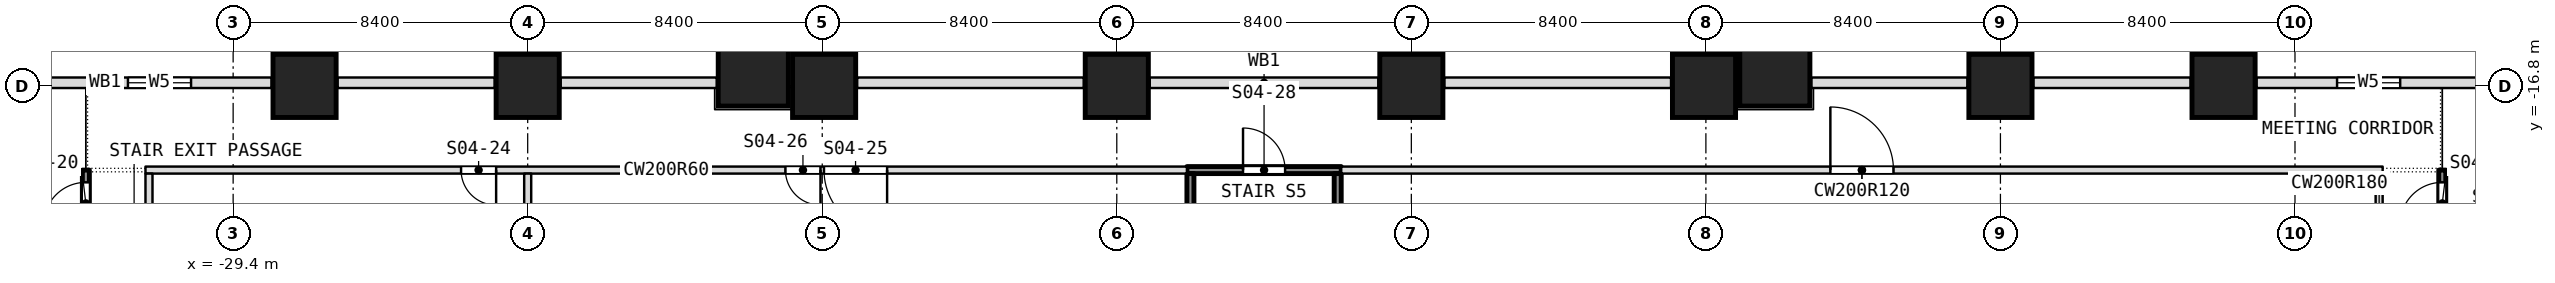
"""IFC4 building model, lengths in metres.
Left out: names, types, materials, properties, quantities, classifications, styles, units other than length and angle.
Written with IfcOpenShell. Run it as: python <this file> out.ifc"""

import sys

from ifc_helpers import new_model, si_unit, direction, frame, frame_2d, origin, origin_2d, place, context, subcontext, project, spatial, polyline, rectangle, outline, extrude, element, fill, save


model = new_model("IFC4")
c1 = context("Model", 3, precision=1e-05, world=origin(), true_north=direction((0.0, 1.0)))
c2 = subcontext(c1, "Body", "Model", "MODEL_VIEW")
j1 = project(units=[si_unit("LENGTHUNIT", "METRE"), si_unit("PLANEANGLEUNIT", "RADIAN")], contexts=[c1])
p1 = place(None, origin())
s1 = spatial("IfcSite", under=j1, at=p1, CompositionType="ELEMENT")
p2 = place(p1, origin())
s2 = spatial("IfcBuilding", under=s1, at=p2, CompositionType="ELEMENT")
p3 = place(p2, frame((0.0, 0.0, 21.0)))
s3 = spatial("IfcBuildingStorey", under=s2, at=p3, CompositionType="ELEMENT", Elevation=21.0)
for number, where, z_axis, x_axis in (
    (1, (-21.0, -16.8, 0.0), (0.0, 0.0, 1.0), (1.0, 0.0, 0.0)),
    (2, (-12.546, -16.8, 0.0), (0.0, 0.0, 1.0), (1.0, 0.0, 0.0)),
    (3, (-4.2, -16.8, 0.0), (0.0, 0.0, 1.0), (1.0, 0.0, 0.0)),
    (4, (4.2, -16.8, 0.0), (0.0, 0.0, 1.0), (1.0, 0.0, 0.0)),
    (5, (12.546, -16.8, 0.0), (0.0, 0.0, 1.0), (1.0, 0.0, 0.0)),
    (6, (21.0, -16.8, 0.0), (0.0, 0.0, 1.0), (1.0, 0.0, 0.0)),
    (7, (-27.363, -16.8, 0.0), (0.0, 0.0, 1.0), (1.0, 0.0, 0.0)),
    (8, (27.363, -16.8, 0.0), (0.0, 0.0, 1.0), (1.0, 0.0, 0.0)),
):
    element("IfcColumn", number, at=place(p3, frame(where, z_axis=z_axis, x_axis=x_axis)), inside=s3, PredefinedType="COLUMN", context=c2, shape_type="SweptSolid", body=[
        extrude(rectangle(XDim=1.8, YDim=1.8, at=origin_2d()), origin(), (0.0, 0.0, 1.0), 5.0),
    ])
for number, where, z_axis, x_axis in (
    (9, (-14.566, -16.375, 0.0), (0.0, 0.0, 1.0), (1.0, 0.0, 0.0)),
    (10, (14.566, -16.375, 0.0), (0.0, 0.0, 1.0), (1.0, 0.0, 0.0)),
):
    element("IfcColumn", number, at=place(p3, frame(where, z_axis=z_axis, x_axis=x_axis)), inside=s3, PredefinedType="COLUMN", context=c2, shape_type="SweptSolid", body=[
        extrude(rectangle(XDim=2.0, YDim=2.0, at=origin_2d()), origin(), (0.0, 0.0, 1.0), 5.0),
    ])
p4 = place(p3, frame((37.8, -14.4, 4.641), z_axis=(1.0, 0.0, 0.0), x_axis=(0.0, 0.799608184746, 0.600522065279)))
e11 = element("IfcWall", 11, at=p4, inside=s3, PredefinedType="SOLIDWALL", context=c2, shape_type="SweptSolid", body=[
    extrude(outline(polyline([(0.0, 0.0), (0.598, -5.551e-17), (-3.622, 3.17), (-6.625, -0.828), (-5.43, -1.726), (-3.625, -0.83), (-1.684, -0.243), (0.0, 0.0)])), origin(), (0.0, 0.0, -1.0), 4.2),
])
p5 = place(p3, frame((-37.8, -14.4, 4.641), z_axis=(-1.0, 0.0, 0.0), x_axis=(0.0, -0.705526339146, -0.708683698678)))
e12 = element("IfcWall", 12, at=p5, inside=s3, PredefinedType="SOLIDWALL", context=c2, shape_type="SweptSolid", body=[
    extrude(outline(polyline([(0.0, 0.0), (1.701, -1.11e-16), (3.707, -0.304), (5.621, -0.932), (6.675, 0.128), (3.132, 3.655), (-0.592, -0.086), (0.0, 0.0)])), origin(), (0.0, 0.0, -1.0), 4.2),
])
p6 = place(p3, frame((33.6, -22.3, 0.0), z_axis=(0.0, 0.0, 1.0), x_axis=(0.0, 1.0, 0.0)))
e13 = element("IfcWall", 13, at=p6, inside=s3, PredefinedType="PARTITIONING", context=c2, shape_type="SweptSolid", body=[
    extrude(rectangle(XDim=3.1, YDim=0.2, at=frame_2d((1.55, 0.0))), origin(), (0.0, 0.0, 1.0), 4.68),
])
p7 = place(p6, frame((1.55, 0.0, 0.0)))
e14 = element("IfcOpeningElement", 14, at=p7, cuts=e13, PredefinedType="OPENING", context=c2, shape_type="SweptSolid", body=[
    extrude(rectangle(XDim=1.2, YDim=2.1, at=frame_2d((0.6, 1.05))), frame((0.0, 0.1, 0.0), z_axis=(0.0, -1.0, 0.0), x_axis=(1.0, 0.0, 0.0)), (0.0, 0.0, 1.0), 0.2),
])
p8 = place(p3, frame((31.8, -22.1, 0.0), z_axis=(0.0, 0.0, 1.0), x_axis=(0.0, 1.0, 0.0)))
e15 = element("IfcWall", 15, at=p8, inside=s3, PredefinedType="PARTITIONING", context=c2, shape_type="SweptSolid", body=[
    extrude(rectangle(XDim=2.8, YDim=0.2, at=frame_2d((1.4, 0.0))), origin(), (0.0, 0.0, 1.0), 4.68),
])
p9 = place(p3, frame((-31.9, -19.2, 0.0), z_axis=(0.0, 0.0, 1.0), x_axis=(1.0, 0.0, 0.0)))
e16 = element("IfcWall", 16, at=p9, inside=s3, PredefinedType="PARTITIONING", context=c2, shape_type="SweptSolid", body=[
    extrude(rectangle(XDim=29.7, YDim=0.2, at=frame_2d((14.85, 0.0))), origin(), (0.0, 0.0, 1.0), 4.68),
])
p10 = place(p9, frame((9.0, 0.0, 0.0)))
e17 = element("IfcOpeningElement", 17, at=p10, cuts=e16, PredefinedType="OPENING", context=c2, shape_type="SweptSolid", body=[
    extrude(rectangle(XDim=1.0, YDim=2.1, at=frame_2d((0.5, 1.05))), frame((0.0, 0.1, 0.0), z_axis=(0.0, -1.0, 0.0), x_axis=(1.0, 0.0, 0.0)), (0.0, 0.0, 1.0), 0.2),
])
p11 = place(p9, frame((19.35, 0.0, 0.0)))
e18 = element("IfcOpeningElement", 18, at=p11, cuts=e16, PredefinedType="OPENING", context=c2, shape_type="SweptSolid", body=[
    extrude(rectangle(XDim=1.8, YDim=2.1, at=frame_2d((0.9, 1.05))), frame((0.0, 0.1, 0.0), z_axis=(0.0, -1.0, 0.0), x_axis=(1.0, 0.0, 0.0)), (0.0, 0.0, 1.0), 0.2),
])
p12 = place(p9, frame((18.25, 0.0, 0.0)))
e19 = element("IfcOpeningElement", 19, at=p12, cuts=e16, PredefinedType="OPENING", context=c2, shape_type="SweptSolid", body=[
    extrude(rectangle(XDim=1.0, YDim=2.1, at=frame_2d((0.5, 1.05))), frame((0.0, 0.1, 0.0), z_axis=(0.0, -1.0, 0.0), x_axis=(1.0, 0.0, 0.0)), (0.0, 0.0, 1.0), 0.2),
])
p13 = place(p3, frame((2.2, -19.2, 0.0), z_axis=(0.0, 0.0, 1.0), x_axis=(1.0, 0.0, 0.0)))
e20 = element("IfcWall", 20, at=p13, inside=s3, PredefinedType="PARTITIONING", context=c2, shape_type="SweptSolid", body=[
    extrude(rectangle(XDim=29.7, YDim=0.2, at=frame_2d((14.85, 0.0))), origin(), (0.0, 0.0, 1.0), 4.68),
])
p14 = place(p13, frame((13.95, 0.0, 0.0)))
e21 = element("IfcOpeningElement", 21, at=p14, cuts=e20, PredefinedType="OPENING", context=c2, shape_type="SweptSolid", body=[
    extrude(rectangle(XDim=1.8, YDim=2.1, at=frame_2d((0.9, 1.05))), frame((0.0, 0.1, 0.0), z_axis=(0.0, -1.0, 0.0), x_axis=(1.0, 0.0, 0.0)), (0.0, 0.0, 1.0), 0.2),
])
p15 = place(p3, frame((-2.2, -19.2, 0.0), z_axis=(0.0, 0.0, 1.0), x_axis=(1.0, 0.0, 0.0)))
e22 = element("IfcWall", 22, at=p15, inside=s3, PredefinedType="PARTITIONING", context=c2, shape_type="SweptSolid", body=[
    extrude(rectangle(XDim=4.4, YDim=0.2, at=frame_2d((2.2, 0.0))), origin(), (0.0, 0.0, 1.0), 4.68),
])
p16 = place(p15, frame((1.6, 0.0, 0.0)))
e23 = element("IfcOpeningElement", 23, at=p16, cuts=e22, PredefinedType="OPENING", context=c2, shape_type="SweptSolid", body=[
    extrude(rectangle(XDim=1.2, YDim=2.1, at=frame_2d((0.6, 1.05))), frame((0.0, 0.1, 0.0), z_axis=(0.0, -1.0, 0.0), x_axis=(1.0, 0.0, 0.0)), (0.0, 0.0, 1.0), 0.2),
])
for number, where, z_axis, x_axis in (
    (24, (2.1, -25.14, 0.0), (0.0, 0.0, 1.0), (0.0, 1.0, 0.0)),
    (25, (-2.1, -25.14, 0.0), (0.0, 0.0, 1.0), (0.0, 1.0, 0.0)),
):
    element("IfcWall", number, at=place(p3, frame(where, z_axis=z_axis, x_axis=x_axis)), inside=s3, PredefinedType="PARTITIONING", context=c2, shape_type="SweptSolid", body=[
        extrude(rectangle(XDim=5.84, YDim=0.2, at=frame_2d((2.92, 0.0))), origin(), (0.0, 0.0, 1.0), 4.68),
    ])
p17 = place(p3, frame((-21.0, -25.5, 0.0), z_axis=(0.0, 0.0, 1.0), x_axis=(0.0, 1.0, 0.0)))
e26 = element("IfcWall", 26, at=p17, inside=s3, PredefinedType="PARTITIONING", context=c2, shape_type="SweptSolid", body=[
    extrude(rectangle(XDim=6.2, YDim=0.2, at=frame_2d((3.1, 0.0))), origin(), (0.0, 0.0, 1.0), 4.68),
])
p18 = place(p3, frame((-31.8, -22.1, 0.0), z_axis=(0.0, 0.0, 1.0), x_axis=(0.0, 1.0, 0.0)))
e27 = element("IfcWall", 27, at=p18, inside=s3, PredefinedType="PARTITIONING", context=c2, shape_type="SweptSolid", body=[
    extrude(rectangle(XDim=2.8, YDim=0.2, at=frame_2d((1.4, 0.0))), origin(), (0.0, 0.0, 1.0), 4.68),
])
p19 = place(p3, frame((-33.6, -22.3, 0.0), z_axis=(0.0, 0.0, 1.0), x_axis=(0.0, 1.0, 0.0)))
e28 = element("IfcWall", 28, at=p19, inside=s3, PredefinedType="PARTITIONING", context=c2, shape_type="SweptSolid", body=[
    extrude(rectangle(XDim=3.1, YDim=0.2, at=frame_2d((1.55, 0.0))), origin(), (0.0, 0.0, 1.0), 4.68),
])
p20 = place(p19, frame((1.55, 0.0, 0.0)))
e29 = element("IfcOpeningElement", 29, at=p20, cuts=e28, PredefinedType="OPENING", context=c2, shape_type="SweptSolid", body=[
    extrude(rectangle(XDim=1.2, YDim=2.1, at=frame_2d((0.6, 1.05))), frame((0.0, 0.1, 0.0), z_axis=(0.0, -1.0, 0.0), x_axis=(1.0, 0.0, 0.0)), (0.0, 0.0, 1.0), 0.2),
])
p21 = place(p3, frame((37.8, -16.71, 0.0), z_axis=(0.0, 0.0, 1.0), x_axis=(-1.0, 0.0, 0.0)))
e30 = element("IfcWall", 30, at=p21, inside=s3, PredefinedType="NOTDEFINED", context=c2, shape_type="SweptSolid", body=[
    extrude(rectangle(XDim=9.497, YDim=0.3, at=frame_2d((4.749, 0.0))), origin(), (0.0, 0.0, 1.0), 3.78),
])
p22 = place(p21, frame((5.4, 0.0, 1.2)))
e31 = element("IfcOpeningElement", 31, at=p22, cuts=e30, PredefinedType="OPENING", context=c2, shape_type="SweptSolid", body=[
    extrude(rectangle(XDim=1.8, YDim=2.4, at=frame_2d((0.9, 1.2))), frame((0.0, 0.15, 0.0), z_axis=(0.0, -1.0, 0.0), x_axis=(1.0, 0.0, 0.0)), (0.0, 0.0, 1.0), 0.3),
])
p23 = place(p3, frame((26.423, -16.71, 0.0), z_axis=(0.0, 0.0, 1.0), x_axis=(-1.0, 0.0, 0.0)))
e32 = element("IfcWall", 32, at=p23, inside=s3, PredefinedType="NOTDEFINED", context=c2, shape_type="SweptSolid", body=[
    extrude(rectangle(XDim=4.483, YDim=0.3, at=frame_2d((2.242, 0.0))), origin(), (0.0, 0.0, 1.0), 3.78),
])
p24 = place(p3, frame((20.06, -16.71, 0.0), z_axis=(0.0, 0.0, 1.0), x_axis=(-1.0, 0.0, 0.0)))
e33 = element("IfcWall", 33, at=p24, inside=s3, PredefinedType="NOTDEFINED", context=c2, shape_type="SweptSolid", body=[
    extrude(rectangle(XDim=4.454, YDim=0.3, at=frame_2d((2.227, 0.0))), origin(), (0.0, 0.0, 1.0), 3.78),
])
p25 = place(p3, frame((11.606, -16.71, 0.0), z_axis=(0.0, 0.0, 1.0), x_axis=(-1.0, 0.0, 0.0)))
e34 = element("IfcWall", 34, at=p25, inside=s3, PredefinedType="NOTDEFINED", context=c2, shape_type="SweptSolid", body=[
    extrude(rectangle(XDim=6.466, YDim=0.3, at=frame_2d((3.233, 0.0))), origin(), (0.0, 0.0, 1.0), 3.78),
])
p26 = place(p3, frame((3.26, -16.71, 0.0), z_axis=(0.0, 0.0, 1.0), x_axis=(-1.0, 0.0, 0.0)))
e35 = element("IfcWall", 35, at=p26, inside=s3, PredefinedType="NOTDEFINED", context=c2, shape_type="SweptSolid", body=[
    extrude(rectangle(XDim=6.52, YDim=0.3, at=frame_2d((3.26, 0.0))), origin(), (0.0, 0.0, 1.0), 3.78),
])
p27 = place(p3, frame((-5.14, -16.71, 0.0), z_axis=(0.0, 0.0, 1.0), x_axis=(-1.0, 0.0, 0.0)))
e36 = element("IfcWall", 36, at=p27, inside=s3, PredefinedType="NOTDEFINED", context=c2, shape_type="SweptSolid", body=[
    extrude(rectangle(XDim=6.466, YDim=0.3, at=frame_2d((3.233, 0.0))), origin(), (0.0, 0.0, 1.0), 3.78),
])
p28 = place(p3, frame((-15.606, -16.71, 0.0), z_axis=(0.0, 0.0, 1.0), x_axis=(-1.0, 0.0, 0.0)))
e37 = element("IfcWall", 37, at=p28, inside=s3, PredefinedType="NOTDEFINED", context=c2, shape_type="SweptSolid", body=[
    extrude(rectangle(XDim=4.454, YDim=0.3, at=frame_2d((2.227, 0.0))), origin(), (0.0, 0.0, 1.0), 3.78),
])
p29 = place(p3, frame((-21.94, -16.71, 0.0), z_axis=(0.0, 0.0, 1.0), x_axis=(-1.0, 0.0, 0.0)))
e38 = element("IfcWall", 38, at=p29, inside=s3, PredefinedType="NOTDEFINED", context=c2, shape_type="SweptSolid", body=[
    extrude(rectangle(XDim=4.483, YDim=0.3, at=frame_2d((2.242, 0.0))), origin(), (0.0, 0.0, 1.0), 3.78),
])
p30 = place(p3, frame((-28.303, -16.71, 0.0), z_axis=(0.0, 0.0, 1.0), x_axis=(-1.0, 0.0, 0.0)))
e39 = element("IfcWall", 39, at=p30, inside=s3, PredefinedType="NOTDEFINED", context=c2, shape_type="SweptSolid", body=[
    extrude(rectangle(XDim=9.497, YDim=0.3, at=frame_2d((4.749, 0.0))), origin(), (0.0, 0.0, 1.0), 3.78),
])
p31 = place(p30, frame((2.297, 0.0, 1.2)))
e40 = element("IfcOpeningElement", 40, at=p31, cuts=e39, PredefinedType="OPENING", context=c2, shape_type="SweptSolid", body=[
    extrude(rectangle(XDim=1.8, YDim=2.4, at=frame_2d((0.9, 1.2))), frame((0.0, 0.15, 0.0), z_axis=(0.0, -1.0, 0.0), x_axis=(1.0, 0.0, 0.0)), (0.0, 0.0, 1.0), 0.3),
])
p32 = place(p20, origin())
e41 = element("IfcDoor", 41, at=p32, inside=s3, OperationType="SINGLE_SWING_RIGHT", PredefinedType="DOOR", context=c2, shape_type="SweptSolid", body=[
    extrude(rectangle(XDim=1.2, YDim=2.1, at=frame_2d((0.6, 1.05))), frame((0.0, 0.025, 0.0), z_axis=(0.0, -1.0, 0.0), x_axis=(1.0, 0.0, 0.0)), (0.0, 0.0, 1.0), 0.05),
])
fill(e29, e41)
p33 = place(p7, origin())
e42 = element("IfcDoor", 42, at=p33, inside=s3, OperationType="SINGLE_SWING_LEFT", PredefinedType="DOOR", context=c2, shape_type="SweptSolid", body=[
    extrude(rectangle(XDim=1.2, YDim=2.1, at=frame_2d((0.6, 1.05))), frame((0.0, 0.025, 0.0), z_axis=(0.0, -1.0, 0.0), x_axis=(1.0, 0.0, 0.0)), (0.0, 0.0, 1.0), 0.05),
])
fill(e14, e42)
p34 = place(p10, origin())
e43 = element("IfcDoor", 43, at=p34, inside=s3, OperationType="SINGLE_SWING_RIGHT", PredefinedType="DOOR", context=c2, shape_type="SweptSolid", body=[
    extrude(rectangle(XDim=1.0, YDim=2.1, at=frame_2d((0.5, 1.05))), frame((0.0, 0.025, 0.0), z_axis=(0.0, -1.0, 0.0), x_axis=(1.0, 0.0, 0.0)), (0.0, 0.0, 1.0), 0.05),
])
fill(e17, e43)
p35 = place(p11, origin())
e44 = element("IfcDoor", 44, at=p35, inside=s3, OperationType="DOUBLE_DOOR_SINGLE_SWING", PredefinedType="DOOR", context=c2, shape_type="SweptSolid", body=[
    extrude(rectangle(XDim=1.8, YDim=2.1, at=frame_2d((0.9, 1.05))), frame((0.0, 0.025, 0.0), z_axis=(0.0, -1.0, 0.0), x_axis=(1.0, 0.0, 0.0)), (0.0, 0.0, 1.0), 0.05),
])
fill(e18, e44)
p36 = place(p12, origin())
e45 = element("IfcDoor", 45, at=p36, inside=s3, OperationType="SINGLE_SWING_LEFT", PredefinedType="DOOR", context=c2, shape_type="SweptSolid", body=[
    extrude(rectangle(XDim=1.0, YDim=2.1, at=frame_2d((0.5, 1.05))), frame((0.0, 0.025, 0.0), z_axis=(0.0, -1.0, 0.0), x_axis=(1.0, 0.0, 0.0)), (0.0, 0.0, 1.0), 0.05),
])
fill(e19, e45)
p37 = place(p14, origin())
e46 = element("IfcDoor", 46, at=p37, inside=s3, OperationType="DOUBLE_DOOR_SINGLE_SWING", PredefinedType="DOOR", context=c2, shape_type="SweptSolid", body=[
    extrude(rectangle(XDim=1.8, YDim=2.1, at=frame_2d((0.9, 1.05))), frame((0.0, 0.025, 0.0), z_axis=(0.0, -1.0, 0.0), x_axis=(1.0, 0.0, 0.0)), (0.0, 0.0, 1.0), 0.05),
])
fill(e21, e46)
p38 = place(p16, origin())
e47 = element("IfcDoor", 47, at=p38, inside=s3, OperationType="SINGLE_SWING_RIGHT", PredefinedType="DOOR", context=c2, shape_type="SweptSolid", body=[
    extrude(rectangle(XDim=1.2, YDim=2.1, at=frame_2d((0.6, 1.05))), frame((0.0, 0.025, 0.0), z_axis=(0.0, -1.0, 0.0), x_axis=(1.0, 0.0, 0.0)), (0.0, 0.0, 1.0), 0.05),
])
fill(e23, e47)
p39 = place(p22, origin())
e48 = element("IfcWindow", 48, at=p39, inside=s3, PartitioningType="SINGLE_PANEL", PredefinedType="WINDOW", context=c2, shape_type="SweptSolid", body=[
    extrude(rectangle(XDim=1.8, YDim=2.4, at=frame_2d((0.9, 1.2))), frame((0.0, 0.03, 0.0), z_axis=(0.0, -1.0, 0.0), x_axis=(1.0, 0.0, 0.0)), (0.0, 0.0, 1.0), 0.06),
])
fill(e31, e48)
p40 = place(p31, origin())
e49 = element("IfcWindow", 49, at=p40, inside=s3, PartitioningType="SINGLE_PANEL", PredefinedType="WINDOW", context=c2, shape_type="SweptSolid", body=[
    extrude(rectangle(XDim=1.8, YDim=2.4, at=frame_2d((0.9, 1.2))), frame((0.0, 0.03, 0.0), z_axis=(0.0, -1.0, 0.0), x_axis=(1.0, 0.0, 0.0)), (0.0, 0.0, 1.0), 0.06),
])
fill(e40, e49)
save(model, sys.argv[1])
